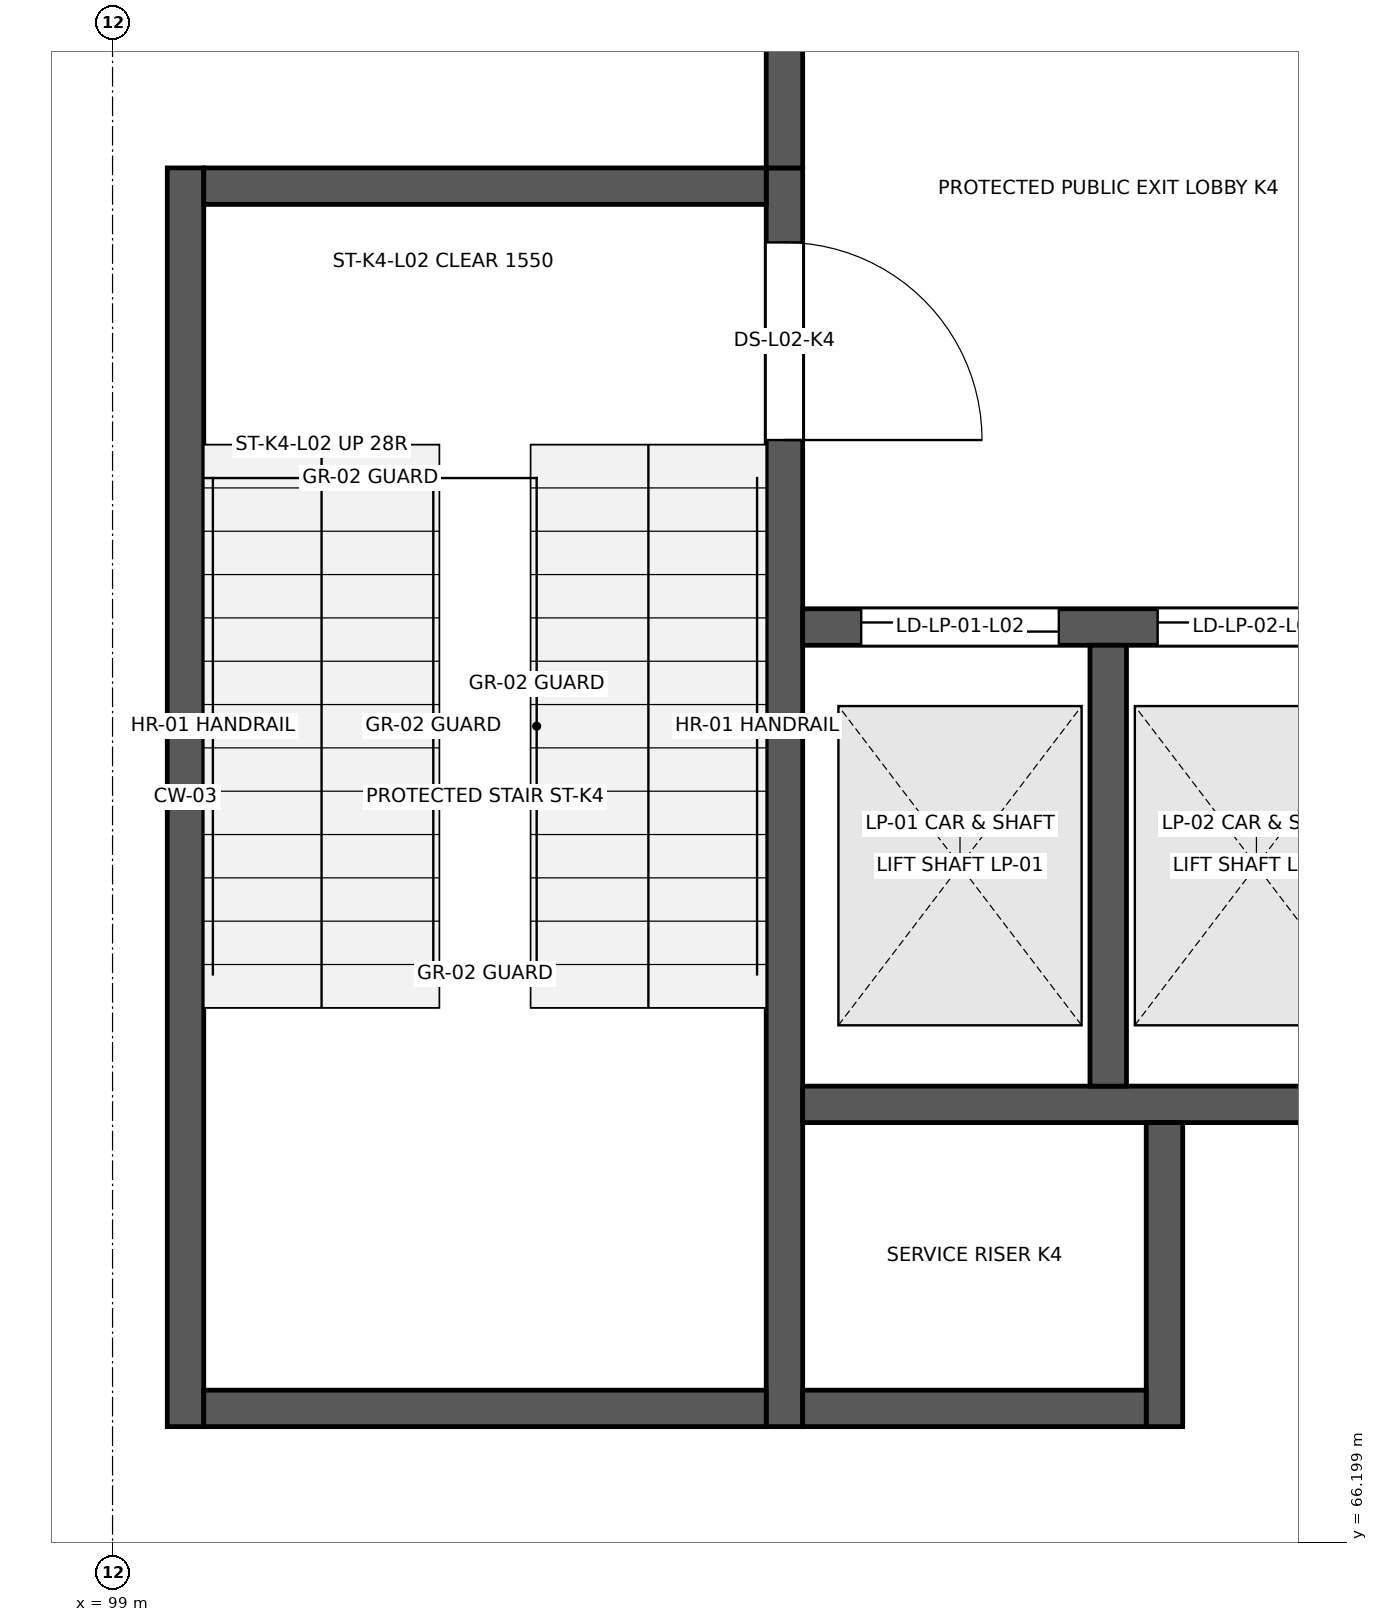
"""IFC4 building model, lengths in metres.
Left out: names, types, materials, properties, quantities, classifications, styles, units other than length and angle.
Written with IfcOpenShell. Run it as: python <this file> out.ifc"""

import sys

from ifc_helpers import new_model, si_unit, direction, frame, frame_2d, origin, place, context, subcontext, project, spatial, rectangle, extrude, element, fill, save


model = new_model("IFC4")
c1 = context("Model", 3, precision=1e-05, world=origin(), true_north=direction((0.0, 1.0)))
c2 = subcontext(c1, "Body", "Model", "MODEL_VIEW")
j1 = project(units=[si_unit("LENGTHUNIT", "METRE"), si_unit("PLANEANGLEUNIT", "RADIAN")], contexts=[c1])
p1 = place(None, origin())
s1 = spatial("IfcSite", under=j1, at=p1, CompositionType="ELEMENT")
p2 = place(p1, origin())
s2 = spatial("IfcBuilding", under=s1, at=p2, CompositionType="ELEMENT")
p3 = place(p2, frame((0.0, 0.0, 9.9)))
s3 = spatial("IfcBuildingStorey", under=s2, at=p3, CompositionType="ELEMENT", Elevation=9.9)
p4 = place(p3, frame((99.48, 66.96, 0.0), z_axis=(0.0, 0.0, 1.0), x_axis=(0.0, 1.0, 0.0)))
e1 = element("IfcWall", 1, at=p4, inside=s3, PredefinedType="SHEAR", context=c2, shape_type="SweptSolid", body=[
    extrude(rectangle(XDim=8.28, YDim=0.24, at=frame_2d((4.14, 0.0))), origin(), (0.0, 0.0, 1.0), 4.31),
])
p5 = place(p3, frame((103.42, 66.96, 0.0), z_axis=(0.0, 0.0, 1.0), x_axis=(0.0, 1.0, 0.0)))
e2 = element("IfcWall", 2, at=p5, inside=s3, PredefinedType="SHEAR", context=c2, shape_type="SweptSolid", body=[
    extrude(rectangle(XDim=8.28, YDim=0.24, at=frame_2d((4.14, 0.0))), origin(), (0.0, 0.0, 1.0), 4.31),
])
p6 = place(p5, frame((6.49, 0.0, 0.0)))
e3 = element("IfcOpeningElement", 3, at=p6, cuts=e2, PredefinedType="OPENING", context=c2, shape_type="SweptSolid", body=[
    extrude(rectangle(XDim=1.3, YDim=2.2, at=frame_2d((0.65, 1.1))), frame((0.0, 0.135, 0.0), z_axis=(0.0, -1.0, 0.0), x_axis=(1.0, 0.0, 0.0)), (0.0, 0.0, 1.0), 0.27),
])
for number, where, z_axis, x_axis in (
    (4, (99.6, 67.08, 0.0), (0.0, 0.0, 1.0), (1.0, 0.0, 0.0)),
    (5, (99.6, 75.12, 0.0), (0.0, 0.0, 1.0), (1.0, 0.0, 0.0)),
):
    element("IfcWall", number, at=place(p3, frame(where, z_axis=z_axis, x_axis=x_axis)), inside=s3, PredefinedType="SHEAR", context=c2, shape_type="SweptSolid", body=[
        extrude(rectangle(XDim=3.7, YDim=0.24, at=frame_2d((1.85, 0.0))), origin(), (0.0, 0.0, 1.0), 4.31),
    ])
p7 = place(p3, frame((103.42, 75.24, 0.0), z_axis=(0.0, 0.0, 1.0), x_axis=(0.0, 1.0, 0.0)))
e6 = element("IfcWall", 6, at=p7, inside=s3, PredefinedType="SHEAR", context=c2, shape_type="SweptSolid", body=[
    extrude(rectangle(XDim=2.76, YDim=0.24, at=frame_2d((1.38, 0.0))), origin(), (0.0, 0.0, 1.0), 4.16),
])
p8 = place(p3, frame((103.54, 72.22, 0.0), z_axis=(0.0, 0.0, 1.0), x_axis=(1.0, 0.0, 0.0)))
e7 = element("IfcWall", 7, at=p8, inside=s3, PredefinedType="SHEAR", context=c2, shape_type="SweptSolid", body=[
    extrude(rectangle(XDim=3.9, YDim=0.24, at=frame_2d((1.95, 0.0))), origin(), (0.0, 0.0, 1.0), 4.31),
])
p9 = place(p8, frame((0.385, 0.0, 0.0)))
e8 = element("IfcOpeningElement", 8, at=p9, cuts=e7, PredefinedType="OPENING", context=c2, shape_type="SweptSolid", body=[
    extrude(rectangle(XDim=1.3, YDim=2.2, at=frame_2d((0.65, 1.1))), frame((0.0, 0.135, 0.0), z_axis=(0.0, -1.0, 0.0), x_axis=(1.0, 0.0, 0.0)), (0.0, 0.0, 1.0), 0.27),
])
p10 = place(p8, frame((2.335, 0.0, 0.0)))
e9 = element("IfcOpeningElement", 9, at=p10, cuts=e7, PredefinedType="OPENING", context=c2, shape_type="SweptSolid", body=[
    extrude(rectangle(XDim=1.3, YDim=2.2, at=frame_2d((0.65, 1.1))), frame((0.0, 0.135, 0.0), z_axis=(0.0, -1.0, 0.0), x_axis=(1.0, 0.0, 0.0)), (0.0, 0.0, 1.0), 0.27),
])
p11 = place(p3, frame((103.54, 69.08, 0.0), z_axis=(0.0, 0.0, 1.0), x_axis=(1.0, 0.0, 0.0)))
e10 = element("IfcWall", 10, at=p11, inside=s3, PredefinedType="SHEAR", context=c2, shape_type="SweptSolid", body=[
    extrude(rectangle(XDim=3.9, YDim=0.24, at=frame_2d((1.95, 0.0))), origin(), (0.0, 0.0, 1.0), 4.31),
])
p12 = place(p3, frame((105.55, 69.2, 0.0), z_axis=(0.0, 0.0, 1.0), x_axis=(0.0, 1.0, 0.0)))
e11 = element("IfcWall", 11, at=p12, inside=s3, PredefinedType="SHEAR", context=c2, shape_type="SweptSolid", body=[
    extrude(rectangle(XDim=2.9, YDim=0.24, at=frame_2d((1.45, 0.0))), origin(), (0.0, 0.0, 1.0), 4.31),
])
p13 = place(p3, frame((105.92, 66.96, 0.0), z_axis=(0.0, 0.0, 1.0), x_axis=(0.0, 1.0, 0.0)))
e12 = element("IfcWall", 12, at=p13, inside=s3, PredefinedType="SHEAR", context=c2, shape_type="SweptSolid", body=[
    extrude(rectangle(XDim=2.0, YDim=0.24, at=frame_2d((1.0, 0.0))), origin(), (0.0, 0.0, 1.0), 4.31),
])
p14 = place(p3, frame((103.54, 67.08, 0.0), z_axis=(0.0, 0.0, 1.0), x_axis=(1.0, 0.0, 0.0)))
e13 = element("IfcWall", 13, at=p14, inside=s3, PredefinedType="SHEAR", context=c2, shape_type="SweptSolid", body=[
    extrude(rectangle(XDim=2.26, YDim=0.24, at=frame_2d((1.13, 0.0))), origin(), (0.0, 0.0, 1.0), 4.31),
])
p15 = place(p6, frame((1.3, 0.0, 0.0), z_axis=(0.0, 0.0, 1.0), x_axis=(-1.0, 0.0, 0.0)))
e14 = element("IfcDoor", 14, at=p15, inside=s3, OperationType="SINGLE_SWING_LEFT", PredefinedType="DOOR", context=c2, shape_type="SweptSolid", body=[
    extrude(rectangle(XDim=1.3, YDim=2.2, at=frame_2d((0.65, 1.1))), frame((0.0, 0.025, 0.0), z_axis=(0.0, -1.0, 0.0), x_axis=(1.0, 0.0, 0.0)), (0.0, 0.0, 1.0), 0.05),
])
fill(e3, e14)
p16 = place(p9, origin())
e15 = element("IfcDoor", 15, at=p16, inside=s3, OperationType="DOUBLE_DOOR_SLIDING", PredefinedType="DOOR", context=c2, shape_type="SweptSolid", body=[
    extrude(rectangle(XDim=1.3, YDim=2.2, at=frame_2d((0.65, 1.1))), frame((0.0, 0.025, 0.0), z_axis=(0.0, -1.0, 0.0), x_axis=(1.0, 0.0, 0.0)), (0.0, 0.0, 1.0), 0.05),
])
fill(e8, e15)
p17 = place(p10, origin())
e16 = element("IfcDoor", 16, at=p17, inside=s3, OperationType="DOUBLE_DOOR_SLIDING", PredefinedType="DOOR", context=c2, shape_type="SweptSolid", body=[
    extrude(rectangle(XDim=1.3, YDim=2.2, at=frame_2d((0.65, 1.1))), frame((0.0, 0.025, 0.0), z_axis=(0.0, -1.0, 0.0), x_axis=(1.0, 0.0, 0.0)), (0.0, 0.0, 1.0), 0.05),
])
fill(e9, e16)
save(model, sys.argv[1])
